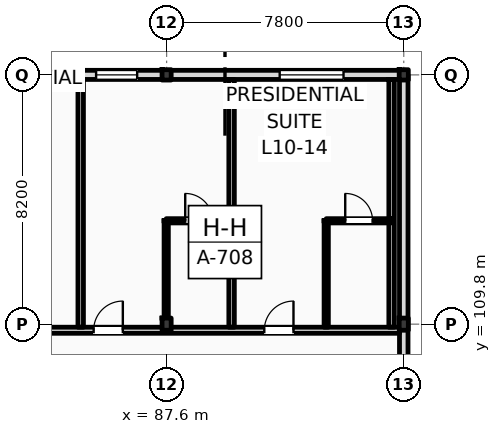
"""IFC4 building model, lengths in metres.
Left out: names, types, materials, properties, quantities, classifications, styles, units other than length and angle.
Written with IfcOpenShell. Run it as: python <this file> out.ifc"""

import sys

from ifc_helpers import new_model, si_unit, direction, frame, frame_2d, origin, origin_2d, place, context, subcontext, project, spatial, rectangle, i_section, extrude, element, fill, save


model = new_model("IFC4")
c1 = context("Model", 3, precision=1e-05, world=origin(), true_north=direction((0.0, 1.0)))
c2 = subcontext(c1, "Body", "Model", "MODEL_VIEW")
j1 = project(units=[si_unit("LENGTHUNIT", "METRE"), si_unit("PLANEANGLEUNIT", "RADIAN")], contexts=[c1])
p1 = place(None, origin())
s1 = spatial("IfcSite", under=j1, at=p1, CompositionType="ELEMENT")
p2 = place(p1, origin())
s2 = spatial("IfcBuilding", under=s1, at=p2, CompositionType="ELEMENT")
p3 = place(p2, frame((0.0, 0.0, 42.6)))
s3 = spatial("IfcBuildingStorey", under=s2, at=p3, CompositionType="ELEMENT", Elevation=42.6)
p4 = place(p3, frame((87.6, 109.8, 0.0), z_axis=(0.0, 0.0, 1.0), x_axis=(1.0, 0.0, 0.0)))
e1 = element("IfcColumn", 1, at=p4, inside=s3, PredefinedType="COLUMN", context=c2, shape_type="SweptSolid", body=[
    extrude(i_section(OverallWidth=0.3, OverallDepth=0.4, WebThickness=0.013, FlangeThickness=0.024, FilletRadius=0.027, at=origin_2d()), origin(), (0.0, 0.0, 1.0), 4.2),
])
p5 = place(p3, frame((87.6, 118.0, 0.0), z_axis=(0.0, 0.0, 1.0), x_axis=(1.0, 0.0, 0.0)))
e2 = element("IfcColumn", 2, at=p5, inside=s3, PredefinedType="COLUMN", context=c2, shape_type="SweptSolid", body=[
    extrude(i_section(OverallWidth=0.3, OverallDepth=0.34, WebThickness=0.012, FlangeThickness=0.021, FilletRadius=0.027, at=origin_2d()), origin(), (0.0, 0.0, 1.0), 4.2),
])
p6 = place(p3, frame((95.4, 109.8, 0.0), z_axis=(0.0, 0.0, 1.0), x_axis=(1.0, 0.0, 0.0)))
e3 = element("IfcColumn", 3, at=p6, inside=s3, PredefinedType="COLUMN", context=c2, shape_type="SweptSolid", body=[
    extrude(i_section(OverallWidth=0.3, OverallDepth=0.4, WebThickness=0.013, FlangeThickness=0.024, FilletRadius=0.027, at=origin_2d()), origin(), (0.0, 0.0, 1.0), 4.2),
])
p7 = place(p3, frame((95.4, 118.0, 0.0), z_axis=(0.0, 0.0, 1.0), x_axis=(1.0, 0.0, 0.0)))
e4 = element("IfcColumn", 4, at=p7, inside=s3, PredefinedType="COLUMN", context=c2, shape_type="SweptSolid", body=[
    extrude(i_section(OverallWidth=0.3, OverallDepth=0.34, WebThickness=0.012, FlangeThickness=0.021, FilletRadius=0.027, at=origin_2d()), origin(), (0.0, 0.0, 1.0), 4.2),
])
p8 = place(p3, frame((22.5, 118.0, 0.0), z_axis=(0.0, 0.0, 1.0), x_axis=(1.0, 0.0, 0.0)))
e5 = element("IfcWall", 5, at=p8, inside=s3, PredefinedType="STANDARD", context=c2, shape_type="SweptSolid", body=[
    extrude(rectangle(XDim=72.9, YDim=0.3, at=frame_2d((36.45, 0.0))), origin(), (0.0, 0.0, 1.0), 3.42),
])
p9 = place(p8, frame((3.611, 0.0, 0.9)))
e6 = element("IfcOpeningElement", 6, at=p9, cuts=e5, PredefinedType="OPENING", context=c2, shape_type="SweptSolid", body=[
    extrude(rectangle(XDim=1.35, YDim=1.75, at=frame_2d((0.675, 0.875))), frame((0.0, 0.16, 0.0), z_axis=(0.0, -1.0, 0.0), x_axis=(1.0, 0.0, 0.0)), (0.0, 0.0, 1.0), 0.32),
])
p10 = place(p8, frame((7.091, 0.0, 0.0)))
e7 = element("IfcOpeningElement", 7, at=p10, cuts=e5, PredefinedType="OPENING", context=c2, shape_type="SweptSolid", body=[
    extrude(rectangle(XDim=1.2, YDim=2.25, at=frame_2d((0.6, 1.125))), frame((0.0, 0.16, 0.0), z_axis=(0.0, -1.0, 0.0), x_axis=(1.0, 0.0, 0.0)), (0.0, 0.0, 1.0), 0.32),
])
p11 = place(p8, frame((12.328, 0.0, 0.9)))
e8 = element("IfcOpeningElement", 8, at=p11, cuts=e5, PredefinedType="OPENING", context=c2, shape_type="SweptSolid", body=[
    extrude(rectangle(XDim=2.0, YDim=2.34, at=frame_2d((1.0, 1.17))), frame((0.0, 0.16, 0.0), z_axis=(0.0, -1.0, 0.0), x_axis=(1.0, 0.0, 0.0)), (0.0, 0.0, 1.0), 0.32),
])
p12 = place(p8, frame((19.12, 0.0, 0.9)))
e9 = element("IfcOpeningElement", 9, at=p12, cuts=e5, PredefinedType="OPENING", context=c2, shape_type="SweptSolid", body=[
    extrude(rectangle(XDim=1.35, YDim=2.34, at=frame_2d((0.675, 1.17))), frame((0.0, 0.16, 0.0), z_axis=(0.0, -1.0, 0.0), x_axis=(1.0, 0.0, 0.0)), (0.0, 0.0, 1.0), 0.32),
])
p13 = place(p8, frame((22.696, 0.0, 0.0)))
e10 = element("IfcOpeningElement", 10, at=p13, cuts=e5, PredefinedType="OPENING", context=c2, shape_type="SweptSolid", body=[
    extrude(rectangle(XDim=1.2, YDim=2.25, at=frame_2d((0.6, 1.125))), frame((0.0, 0.16, 0.0), z_axis=(0.0, -1.0, 0.0), x_axis=(1.0, 0.0, 0.0)), (0.0, 0.0, 1.0), 0.32),
])
p14 = place(p8, frame((27.205, 0.0, 0.9)))
e11 = element("IfcOpeningElement", 11, at=p14, cuts=e5, PredefinedType="OPENING", context=c2, shape_type="SweptSolid", body=[
    extrude(rectangle(XDim=3.1, YDim=2.34, at=frame_2d((1.55, 1.17))), frame((0.0, 0.16, 0.0), z_axis=(0.0, -1.0, 0.0), x_axis=(1.0, 0.0, 0.0)), (0.0, 0.0, 1.0), 0.32),
])
p15 = place(p8, frame((31.948, 0.0, 0.9)))
e12 = element("IfcOpeningElement", 12, at=p15, cuts=e5, PredefinedType="OPENING", context=c2, shape_type="SweptSolid", body=[
    extrude(rectangle(XDim=1.1, YDim=2.34, at=frame_2d((0.55, 1.17))), frame((0.0, 0.16, 0.0), z_axis=(0.0, -1.0, 0.0), x_axis=(1.0, 0.0, 0.0)), (0.0, 0.0, 1.0), 0.32),
])
p16 = place(p8, frame((38.12, 0.0, 0.0)))
e13 = element("IfcOpeningElement", 13, at=p16, cuts=e5, PredefinedType="OPENING", context=c2, shape_type="SweptSolid", body=[
    extrude(rectangle(XDim=1.2, YDim=2.25, at=frame_2d((0.6, 1.125))), frame((0.0, 0.16, 0.0), z_axis=(0.0, -1.0, 0.0), x_axis=(1.0, 0.0, 0.0)), (0.0, 0.0, 1.0), 0.32),
])
p17 = place(p8, frame((43.51, 0.0, 0.9)))
e14 = element("IfcOpeningElement", 14, at=p17, cuts=e5, PredefinedType="OPENING", context=c2, shape_type="SweptSolid", body=[
    extrude(rectangle(XDim=1.35, YDim=1.85, at=frame_2d((0.675, 0.925))), frame((0.0, 0.16, 0.0), z_axis=(0.0, -1.0, 0.0), x_axis=(1.0, 0.0, 0.0)), (0.0, 0.0, 1.0), 0.32),
])
p18 = place(p8, frame((47.178, 0.0, 0.9)))
e15 = element("IfcOpeningElement", 15, at=p18, cuts=e5, PredefinedType="OPENING", context=c2, shape_type="SweptSolid", body=[
    extrude(rectangle(XDim=1.5, YDim=1.9, at=frame_2d((0.75, 0.95))), frame((0.0, 0.16, 0.0), z_axis=(0.0, -1.0, 0.0), x_axis=(1.0, 0.0, 0.0)), (0.0, 0.0, 1.0), 0.32),
])
p19 = place(p8, frame((53.724, 0.0, 0.0)))
e16 = element("IfcOpeningElement", 16, at=p19, cuts=e5, PredefinedType="OPENING", context=c2, shape_type="SweptSolid", body=[
    extrude(rectangle(XDim=1.2, YDim=2.25, at=frame_2d((0.6, 1.125))), frame((0.0, 0.16, 0.0), z_axis=(0.0, -1.0, 0.0), x_axis=(1.0, 0.0, 0.0)), (0.0, 0.0, 1.0), 0.32),
])
p20 = place(p8, frame((58.712, 0.0, 0.9)))
e17 = element("IfcOpeningElement", 17, at=p20, cuts=e5, PredefinedType="OPENING", context=c2, shape_type="SweptSolid", body=[
    extrude(rectangle(XDim=1.8, YDim=2.0, at=frame_2d((0.9, 1.0))), frame((0.0, 0.16, 0.0), z_axis=(0.0, -1.0, 0.0), x_axis=(1.0, 0.0, 0.0)), (0.0, 0.0, 1.0), 0.32),
])
p21 = place(p8, frame((62.781, 0.0, 0.9)))
e18 = element("IfcOpeningElement", 18, at=p21, cuts=e5, PredefinedType="OPENING", context=c2, shape_type="SweptSolid", body=[
    extrude(rectangle(XDim=1.35, YDim=2.05, at=frame_2d((0.675, 1.025))), frame((0.0, 0.16, 0.0), z_axis=(0.0, -1.0, 0.0), x_axis=(1.0, 0.0, 0.0)), (0.0, 0.0, 1.0), 0.32),
])
p22 = place(p8, frame((68.819, 0.0, 0.9)))
e19 = element("IfcOpeningElement", 19, at=p22, cuts=e5, PredefinedType="OPENING", context=c2, shape_type="SweptSolid", body=[
    extrude(rectangle(XDim=2.1, YDim=2.1, at=frame_2d((1.05, 1.05))), frame((0.0, 0.16, 0.0), z_axis=(0.0, -1.0, 0.0), x_axis=(1.0, 0.0, 0.0)), (0.0, 0.0, 1.0), 0.32),
])
p23 = place(p3, frame((95.4, 96.0, 0.0), z_axis=(0.0, 0.0, 1.0), x_axis=(0.0, 1.0, 0.0)))
e20 = element("IfcWall", 20, at=p23, inside=s3, PredefinedType="STANDARD", context=c2, shape_type="SweptSolid", body=[
    extrude(rectangle(XDim=22.0, YDim=0.28, at=frame_2d((11.0, 0.0))), origin(), (0.0, 0.0, 1.0), 3.51),
])
p24 = place(p3, frame((10.65, 109.6, 0.0), z_axis=(0.0, 0.0, 1.0), x_axis=(1.0, 0.0, 0.0)))
e21 = element("IfcWall", 21, at=p24, inside=s3, PredefinedType="PARTITIONING", context=c2, shape_type="SweptSolid", body=[
    extrude(rectangle(XDim=84.61, YDim=0.2, at=frame_2d((42.305, 0.0))), origin(), (0.0, 0.0, 1.0), 3.38),
])
p25 = place(p24, frame((15.926, 0.0, 0.0)))
e22 = element("IfcOpeningElement", 22, at=p25, cuts=e21, PredefinedType="OPENING", context=c2, shape_type="SweptSolid", body=[
    extrude(rectangle(XDim=1.02, YDim=2.2, at=frame_2d((0.51, 1.1))), frame((0.0, 0.11, 0.0), z_axis=(0.0, -1.0, 0.0), x_axis=(1.0, 0.0, 0.0)), (0.0, 0.0, 1.0), 0.22),
])
p26 = place(p24, frame((18.45, 0.0, 0.0)))
e23 = element("IfcOpeningElement", 23, at=p26, cuts=e21, PredefinedType="OPENING", context=c2, shape_type="SweptSolid", body=[
    extrude(rectangle(XDim=1.02, YDim=2.2, at=frame_2d((0.51, 1.1))), frame((0.0, 0.11, 0.0), z_axis=(0.0, -1.0, 0.0), x_axis=(1.0, 0.0, 0.0)), (0.0, 0.0, 1.0), 0.22),
])
p27 = place(p24, frame((25.742, 0.0, 0.0)))
e24 = element("IfcOpeningElement", 24, at=p27, cuts=e21, PredefinedType="OPENING", context=c2, shape_type="SweptSolid", body=[
    extrude(rectangle(XDim=1.02, YDim=2.2, at=frame_2d((0.51, 1.1))), frame((0.0, 0.11, 0.0), z_axis=(0.0, -1.0, 0.0), x_axis=(1.0, 0.0, 0.0)), (0.0, 0.0, 1.0), 0.22),
])
p28 = place(p24, frame((31.385, 0.0, 0.0)))
e25 = element("IfcOpeningElement", 25, at=p28, cuts=e21, PredefinedType="OPENING", context=c2, shape_type="SweptSolid", body=[
    extrude(rectangle(XDim=1.02, YDim=2.2, at=frame_2d((0.51, 1.1))), frame((0.0, 0.11, 0.0), z_axis=(0.0, -1.0, 0.0), x_axis=(1.0, 0.0, 0.0)), (0.0, 0.0, 1.0), 0.22),
])
p29 = place(p24, frame((33.908, 0.0, 0.0)))
e26 = element("IfcOpeningElement", 26, at=p29, cuts=e21, PredefinedType="OPENING", context=c2, shape_type="SweptSolid", body=[
    extrude(rectangle(XDim=0.96, YDim=2.2, at=frame_2d((0.48, 1.1))), frame((0.0, 0.11, 0.0), z_axis=(0.0, -1.0, 0.0), x_axis=(1.0, 0.0, 0.0)), (0.0, 0.0, 1.0), 0.22),
])
p30 = place(p24, frame((41.201, 0.0, 0.0)))
e27 = element("IfcOpeningElement", 27, at=p30, cuts=e21, PredefinedType="OPENING", context=c2, shape_type="SweptSolid", body=[
    extrude(rectangle(XDim=0.96, YDim=2.2, at=frame_2d((0.48, 1.1))), frame((0.0, 0.11, 0.0), z_axis=(0.0, -1.0, 0.0), x_axis=(1.0, 0.0, 0.0)), (0.0, 0.0, 1.0), 0.22),
])
p31 = place(p24, frame((46.844, 0.0, 0.0)))
e28 = element("IfcOpeningElement", 28, at=p31, cuts=e21, PredefinedType="OPENING", context=c2, shape_type="SweptSolid", body=[
    extrude(rectangle(XDim=0.96, YDim=2.2, at=frame_2d((0.48, 1.1))), frame((0.0, 0.11, 0.0), z_axis=(0.0, -1.0, 0.0), x_axis=(1.0, 0.0, 0.0)), (0.0, 0.0, 1.0), 0.22),
])
p32 = place(p24, frame((49.337, 0.0, 0.0)))
e29 = element("IfcOpeningElement", 29, at=p32, cuts=e21, PredefinedType="OPENING", context=c2, shape_type="SweptSolid", body=[
    extrude(rectangle(XDim=0.96, YDim=2.2, at=frame_2d((0.48, 1.1))), frame((0.0, 0.11, 0.0), z_axis=(0.0, -1.0, 0.0), x_axis=(1.0, 0.0, 0.0)), (0.0, 0.0, 1.0), 0.22),
])
p33 = place(p24, frame((56.63, 0.0, 0.0)))
e30 = element("IfcOpeningElement", 30, at=p33, cuts=e21, PredefinedType="OPENING", context=c2, shape_type="SweptSolid", body=[
    extrude(rectangle(XDim=0.96, YDim=2.2, at=frame_2d((0.48, 1.1))), frame((0.0, 0.11, 0.0), z_axis=(0.0, -1.0, 0.0), x_axis=(1.0, 0.0, 0.0)), (0.0, 0.0, 1.0), 0.22),
])
p34 = place(p24, frame((62.523, 0.0, 0.0)))
e31 = element("IfcOpeningElement", 31, at=p34, cuts=e21, PredefinedType="OPENING", context=c2, shape_type="SweptSolid", body=[
    extrude(rectangle(XDim=0.96, YDim=2.2, at=frame_2d((0.48, 1.1))), frame((0.0, 0.11, 0.0), z_axis=(0.0, -1.0, 0.0), x_axis=(1.0, 0.0, 0.0)), (0.0, 0.0, 1.0), 0.22),
])
p35 = place(p24, frame((64.765, 0.0, 0.0)))
e32 = element("IfcOpeningElement", 32, at=p35, cuts=e21, PredefinedType="OPENING", context=c2, shape_type="SweptSolid", body=[
    extrude(rectangle(XDim=0.96, YDim=2.2, at=frame_2d((0.48, 1.1))), frame((0.0, 0.11, 0.0), z_axis=(0.0, -1.0, 0.0), x_axis=(1.0, 0.0, 0.0)), (0.0, 0.0, 1.0), 0.22),
])
p36 = place(p24, frame((72.057, 0.0, 0.0)))
e33 = element("IfcOpeningElement", 33, at=p36, cuts=e21, PredefinedType="OPENING", context=c2, shape_type="SweptSolid", body=[
    extrude(rectangle(XDim=0.96, YDim=2.2, at=frame_2d((0.48, 1.1))), frame((0.0, 0.11, 0.0), z_axis=(0.0, -1.0, 0.0), x_axis=(1.0, 0.0, 0.0)), (0.0, 0.0, 1.0), 0.22),
])
p37 = place(p24, frame((74.55, 0.0, 0.0)))
e34 = element("IfcOpeningElement", 34, at=p37, cuts=e21, PredefinedType="OPENING", context=c2, shape_type="SweptSolid", body=[
    extrude(rectangle(XDim=0.96, YDim=2.2, at=frame_2d((0.48, 1.1))), frame((0.0, 0.11, 0.0), z_axis=(0.0, -1.0, 0.0), x_axis=(1.0, 0.0, 0.0)), (0.0, 0.0, 1.0), 0.22),
])
p38 = place(p24, frame((80.163, 0.0, 0.0)))
e35 = element("IfcOpeningElement", 35, at=p38, cuts=e21, PredefinedType="OPENING", context=c2, shape_type="SweptSolid", body=[
    extrude(rectangle(XDim=0.96, YDim=2.2, at=frame_2d((0.48, 1.1))), frame((0.0, 0.11, 0.0), z_axis=(0.0, -1.0, 0.0), x_axis=(1.0, 0.0, 0.0)), (0.0, 0.0, 1.0), 0.22),
])
p39 = place(p24, frame((2.716, 0.0, 0.0)))
e36 = element("IfcOpeningElement", 36, at=p39, cuts=e21, PredefinedType="OPENING", context=c2, shape_type="SweptSolid", body=[
    extrude(rectangle(XDim=1.35, YDim=2.25, at=frame_2d((0.675, 1.125))), frame((0.0, 0.11, 0.0), z_axis=(0.0, -1.0, 0.0), x_axis=(1.0, 0.0, 0.0)), (0.0, 0.0, 1.0), 0.22),
])
p40 = place(p24, frame((6.65, 0.0, 0.0)))
e37 = element("IfcOpeningElement", 37, at=p40, cuts=e21, PredefinedType="OPENING", context=c2, shape_type="SweptSolid", body=[
    extrude(rectangle(XDim=1.35, YDim=2.25, at=frame_2d((0.675, 1.125))), frame((0.0, 0.11, 0.0), z_axis=(0.0, -1.0, 0.0), x_axis=(1.0, 0.0, 0.0)), (0.0, 0.0, 1.0), 0.22),
])
p41 = place(p24, frame((10.583, 0.0, 0.0)))
e38 = element("IfcOpeningElement", 38, at=p41, cuts=e21, PredefinedType="OPENING", context=c2, shape_type="SweptSolid", body=[
    extrude(rectangle(XDim=1.35, YDim=2.25, at=frame_2d((0.675, 1.125))), frame((0.0, 0.11, 0.0), z_axis=(0.0, -1.0, 0.0), x_axis=(1.0, 0.0, 0.0)), (0.0, 0.0, 1.0), 0.22),
])
p42 = place(p3, frame((84.774, 109.7, 0.0), z_axis=(0.0, 0.0, 1.0), x_axis=(0.0, 1.0, 0.0)))
e39 = element("IfcWall", 39, at=p42, inside=s3, PredefinedType="PARTITIONING", context=c2, shape_type="SweptSolid", body=[
    extrude(rectangle(XDim=8.15, YDim=0.18, at=frame_2d((4.075, 0.0))), origin(), (0.0, 0.0, 1.0), 3.57),
])
p43 = place(p3, frame((89.737, 109.7, 0.0), z_axis=(0.0, 0.0, 1.0), x_axis=(0.0, 1.0, 0.0)))
e40 = element("IfcWall", 40, at=p43, inside=s3, PredefinedType="PARTITIONING", context=c2, shape_type="SweptSolid", body=[
    extrude(rectangle(XDim=8.15, YDim=0.18, at=frame_2d((4.075, 0.0))), origin(), (0.0, 0.0, 1.0), 3.94),
])
p44 = place(p3, frame((87.587, 109.7, 0.0), z_axis=(0.0, 0.0, 1.0), x_axis=(0.0, 1.0, 0.0)))
e41 = element("IfcWall", 41, at=p44, inside=s3, PredefinedType="PARTITIONING", context=c2, shape_type="SweptSolid", body=[
    extrude(rectangle(XDim=3.5, YDim=0.14, at=frame_2d((1.75, 0.0))), origin(), (0.0, 0.0, 1.0), 3.51),
])
p45 = place(p3, frame((87.587, 113.2, 0.0), z_axis=(0.0, 0.0, 1.0), x_axis=(1.0, 0.0, 0.0)))
e42 = element("IfcWall", 42, at=p45, inside=s3, PredefinedType="PARTITIONING", context=c2, shape_type="SweptSolid", body=[
    extrude(rectangle(XDim=2.15, YDim=0.14, at=frame_2d((1.075, 0.0))), origin(), (0.0, 0.0, 1.0), 3.94),
])
p46 = place(p45, frame((0.625, 0.0, 0.0)))
e43 = element("IfcOpeningElement", 43, at=p46, cuts=e42, PredefinedType="OPENING", context=c2, shape_type="SweptSolid", body=[
    extrude(rectangle(XDim=0.9, YDim=2.1, at=frame_2d((0.45, 1.05))), frame((0.0, 0.08, 0.0), z_axis=(0.0, -1.0, 0.0), x_axis=(1.0, 0.0, 0.0)), (0.0, 0.0, 1.0), 0.16),
])
p47 = place(p3, frame((95.0, 109.7, 0.0), z_axis=(0.0, 0.0, 1.0), x_axis=(0.0, 1.0, 0.0)))
e44 = element("IfcWall", 44, at=p47, inside=s3, PredefinedType="PARTITIONING", context=c2, shape_type="SweptSolid", body=[
    extrude(rectangle(XDim=8.15, YDim=0.18, at=frame_2d((4.075, 0.0))), origin(), (0.0, 0.0, 1.0), 3.94),
])
p48 = place(p3, frame((92.85, 109.7, 0.0), z_axis=(0.0, 0.0, 1.0), x_axis=(0.0, 1.0, 0.0)))
e45 = element("IfcWall", 45, at=p48, inside=s3, PredefinedType="PARTITIONING", context=c2, shape_type="SweptSolid", body=[
    extrude(rectangle(XDim=3.5, YDim=0.14, at=frame_2d((1.75, 0.0))), origin(), (0.0, 0.0, 1.0), 3.57),
])
p49 = place(p3, frame((92.85, 113.2, 0.0), z_axis=(0.0, 0.0, 1.0), x_axis=(1.0, 0.0, 0.0)))
e46 = element("IfcWall", 46, at=p49, inside=s3, PredefinedType="PARTITIONING", context=c2, shape_type="SweptSolid", body=[
    extrude(rectangle(XDim=2.15, YDim=0.14, at=frame_2d((1.075, 0.0))), origin(), (0.0, 0.0, 1.0), 3.94),
])
p50 = place(p49, frame((0.625, 0.0, 0.0)))
e47 = element("IfcOpeningElement", 47, at=p50, cuts=e46, PredefinedType="OPENING", context=c2, shape_type="SweptSolid", body=[
    extrude(rectangle(XDim=0.9, YDim=2.1, at=frame_2d((0.45, 1.05))), frame((0.0, 0.08, 0.0), z_axis=(0.0, -1.0, 0.0), x_axis=(1.0, 0.0, 0.0)), (0.0, 0.0, 1.0), 0.16),
])
p51 = place(p21, origin())
e48 = element("IfcWindow", 48, at=p51, inside=s3, PartitioningType="DOUBLE_PANEL_VERTICAL", PredefinedType="WINDOW", context=c2, shape_type="SweptSolid", body=[
    extrude(rectangle(XDim=1.35, YDim=2.05, at=frame_2d((0.675, 1.025))), frame((0.0, 0.03, 0.0), z_axis=(0.0, -1.0, 0.0), x_axis=(1.0, 0.0, 0.0)), (0.0, 0.0, 1.0), 0.06),
])
fill(e18, e48)
p52 = place(p22, origin())
e49 = element("IfcWindow", 49, at=p52, inside=s3, PartitioningType="DOUBLE_PANEL_VERTICAL", PredefinedType="WINDOW", context=c2, shape_type="SweptSolid", body=[
    extrude(rectangle(XDim=2.1, YDim=2.1, at=frame_2d((1.05, 1.05))), frame((0.0, 0.03, 0.0), z_axis=(0.0, -1.0, 0.0), x_axis=(1.0, 0.0, 0.0)), (0.0, 0.0, 1.0), 0.06),
])
fill(e19, e49)
p53 = place(p37, origin())
e50 = element("IfcDoor", 50, at=p53, inside=s3, OperationType="SINGLE_SWING_RIGHT", PredefinedType="DOOR", context=c2, shape_type="SweptSolid", body=[
    extrude(rectangle(XDim=0.96, YDim=2.2, at=frame_2d((0.48, 1.1))), frame((0.0, 0.025, 0.0), z_axis=(0.0, -1.0, 0.0), x_axis=(1.0, 0.0, 0.0)), (0.0, 0.0, 1.0), 0.05),
])
fill(e34, e50)
p54 = place(p46, origin())
e51 = element("IfcDoor", 51, at=p54, inside=s3, OperationType="SINGLE_SWING_LEFT", PredefinedType="DOOR", context=c2, shape_type="SweptSolid", body=[
    extrude(rectangle(XDim=0.9, YDim=2.1, at=frame_2d((0.45, 1.05))), frame((0.0, 0.025, 0.0), z_axis=(0.0, -1.0, 0.0), x_axis=(1.0, 0.0, 0.0)), (0.0, 0.0, 1.0), 0.05),
])
fill(e43, e51)
p55 = place(p38, origin())
e52 = element("IfcDoor", 52, at=p55, inside=s3, OperationType="SINGLE_SWING_RIGHT", PredefinedType="DOOR", context=c2, shape_type="SweptSolid", body=[
    extrude(rectangle(XDim=0.96, YDim=2.2, at=frame_2d((0.48, 1.1))), frame((0.0, 0.025, 0.0), z_axis=(0.0, -1.0, 0.0), x_axis=(1.0, 0.0, 0.0)), (0.0, 0.0, 1.0), 0.05),
])
fill(e35, e52)
p56 = place(p50, origin())
e53 = element("IfcDoor", 53, at=p56, inside=s3, OperationType="SINGLE_SWING_LEFT", PredefinedType="DOOR", context=c2, shape_type="SweptSolid", body=[
    extrude(rectangle(XDim=0.9, YDim=2.1, at=frame_2d((0.45, 1.05))), frame((0.0, 0.025, 0.0), z_axis=(0.0, -1.0, 0.0), x_axis=(1.0, 0.0, 0.0)), (0.0, 0.0, 1.0), 0.05),
])
fill(e47, e53)
save(model, sys.argv[1])
